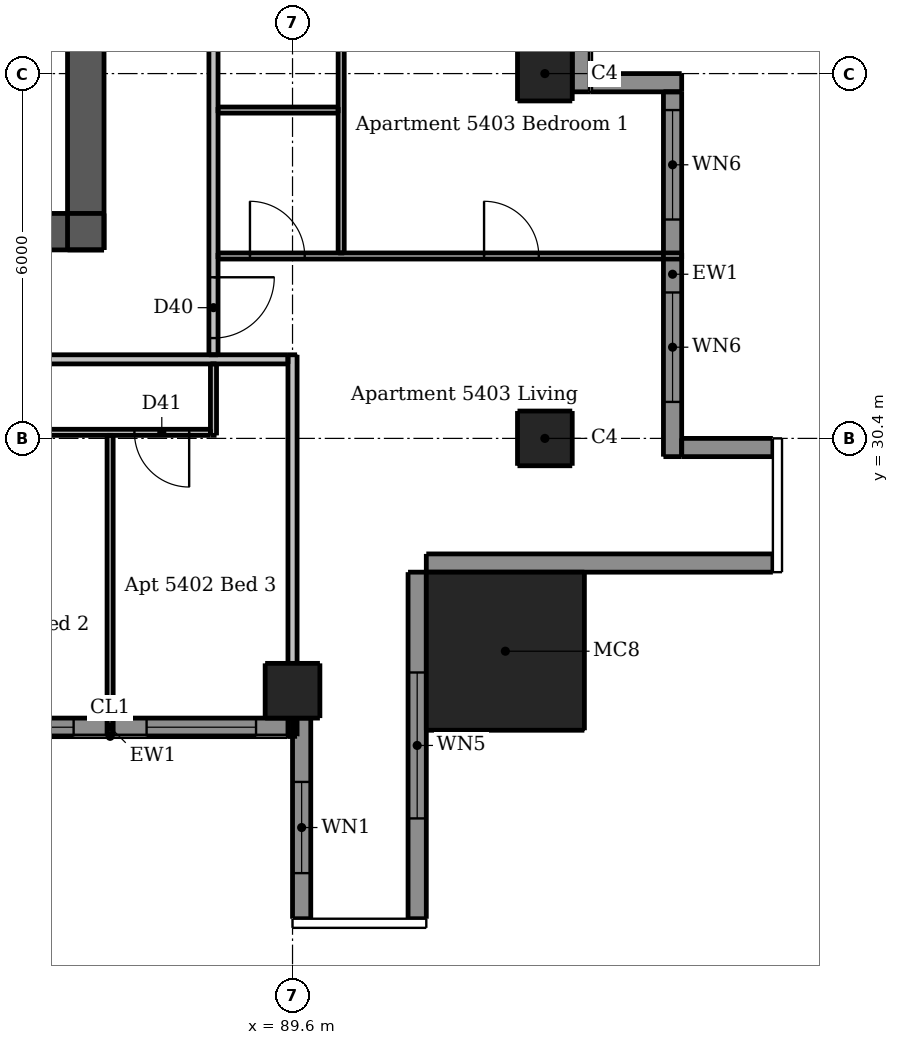
"""IFC4 building model, lengths in metres.
Left out: names, types, materials, properties, quantities, classifications, styles, units other than length and angle.
Written with IfcOpenShell. Run it as: python <this file> out.ifc"""

import sys

from ifc_helpers import new_model, si_unit, direction, frame, frame_2d, origin, origin_2d, place, context, subcontext, project, spatial, rectangle, extrude, element, fill, save


model = new_model("IFC4")
c1 = context("Model", 3, precision=1e-05, world=origin(), true_north=direction((0.0, 1.0)))
c2 = subcontext(c1, "Body", "Model", "MODEL_VIEW")
j1 = project(units=[si_unit("LENGTHUNIT", "METRE"), si_unit("PLANEANGLEUNIT", "RADIAN")], contexts=[c1])
p1 = place(None, origin())
s1 = spatial("IfcSite", under=j1, at=p1, CompositionType="ELEMENT")
p2 = place(p1, origin())
s2 = spatial("IfcBuilding", under=s1, at=p2, CompositionType="ELEMENT")
p3 = place(p2, frame((0.0, 0.0, 203.5)))
s3 = spatial("IfcBuildingStorey", under=s2, at=p3, CompositionType="ELEMENT", Elevation=203.5)
p4 = place(p3, frame((62.5, 33.8, 0.0), z_axis=(0.0, 0.0, 1.0), x_axis=(1.0, 0.0, 0.0)))
e1 = element("IfcWall", 1, at=p4, inside=s3, PredefinedType="SHEAR", context=c2, shape_type="SweptSolid", body=[
    extrude(rectangle(XDim=24.0, YDim=0.6, at=frame_2d((12.0, 0.0))), origin(), (0.0, 0.0, 1.0), 3.05),
])
p5 = place(p4, frame((1.925, 0.0, 0.0)))
e2 = element("IfcOpeningElement", 2, at=p5, cuts=e1, PredefinedType="OPENING", context=c2, shape_type="SweptSolid", body=[
    extrude(rectangle(XDim=1.1, YDim=2.1, at=frame_2d((0.55, 1.05))), frame((0.0, 0.31, 0.0), z_axis=(0.0, -1.0, 0.0), x_axis=(1.0, 0.0, 0.0)), (0.0, 0.0, 1.0), 0.62),
])
p6 = place(p4, frame((20.975, 0.0, 0.0)))
e3 = element("IfcOpeningElement", 3, at=p6, cuts=e1, PredefinedType="OPENING", context=c2, shape_type="SweptSolid", body=[
    extrude(rectangle(XDim=1.1, YDim=2.1, at=frame_2d((0.55, 1.05))), frame((0.0, 0.31, 0.0), z_axis=(0.0, -1.0, 0.0), x_axis=(1.0, 0.0, 0.0)), (0.0, 0.0, 1.0), 0.62),
])
p7 = place(p4, frame((8.0, 0.0, 0.0)))
e4 = element("IfcOpeningElement", 4, at=p7, cuts=e1, PredefinedType="OPENING", context=c2, shape_type="SweptSolid", body=[
    extrude(rectangle(XDim=1.1, YDim=2.1, at=frame_2d((0.55, 1.05))), frame((0.0, 0.31, 0.0), z_axis=(0.0, -1.0, 0.0), x_axis=(1.0, 0.0, 0.0)), (0.0, 0.0, 1.0), 0.62),
])
p8 = place(p4, frame((15.3, 0.0, 0.0)))
e5 = element("IfcOpeningElement", 5, at=p8, cuts=e1, PredefinedType="OPENING", context=c2, shape_type="SweptSolid", body=[
    extrude(rectangle(XDim=0.9, YDim=2.1, at=frame_2d((0.45, 1.05))), frame((0.0, 0.31, 0.0), z_axis=(0.0, -1.0, 0.0), x_axis=(1.0, 0.0, 0.0)), (0.0, 0.0, 1.0), 0.62),
])
p9 = place(p3, frame((86.2, 33.5, 0.0), z_axis=(0.0, 0.0, 1.0), x_axis=(0.0, 1.0, 0.0)))
e6 = element("IfcWall", 6, at=p9, inside=s3, PredefinedType="SHEAR", context=c2, shape_type="SweptSolid", body=[
    extrude(rectangle(XDim=24.0, YDim=0.6, at=frame_2d((12.0, 0.0))), origin(), (0.0, 0.0, 1.0), 3.05),
])
p10 = place(p9, frame((11.2, 0.0, 0.0)))
e7 = element("IfcOpeningElement", 7, at=p10, cuts=e6, PredefinedType="OPENING", context=c2, shape_type="SweptSolid", body=[
    extrude(rectangle(XDim=1.6, YDim=2.1, at=frame_2d((0.8, 1.05))), frame((0.0, 0.31, 0.0), z_axis=(0.0, -1.0, 0.0), x_axis=(1.0, 0.0, 0.0)), (0.0, 0.0, 1.0), 0.62),
])
for number, where, z_axis, x_axis in (
    (8, (89.6, 26.25, 0.0), (0.0, 0.0, 1.0), (1.0, 0.0, 0.0)),
    (9, (93.75, 30.4, 0.0), (0.0, 0.0, 1.0), (1.0, 0.0, 0.0)),
    (10, (93.75, 36.4, 0.0), (0.0, 0.0, 1.0), (1.0, 0.0, 0.0)),
):
    element("IfcColumn", number, at=place(p3, frame(where, z_axis=z_axis, x_axis=x_axis)), inside=s3, PredefinedType="COLUMN", context=c2, shape_type="SweptSolid", body=[
        extrude(rectangle(XDim=0.9, YDim=0.9, at=origin_2d()), origin(), (0.0, 0.0, 1.0), 3.05),
    ])
p11 = place(p3, frame((93.1, 26.9, 0.0), z_axis=(0.0, 0.0, 1.0), x_axis=(1.0, 0.0, 0.0)))
e11 = element("IfcColumn", 11, at=p11, inside=s3, PredefinedType="COLUMN", context=c2, shape_type="SweptSolid", body=[
    extrude(rectangle(XDim=2.6, YDim=2.6, at=origin_2d()), origin(), (0.0, 0.0, 1.0), 3.3),
])
p12 = place(p3, frame((89.75, 25.8, 0.0), z_axis=(0.0, 0.0, 1.0), x_axis=(0.0, -1.0, 0.0)))
e12 = element("IfcWall", 12, at=p12, inside=s3, PredefinedType="SOLIDWALL", context=c2, shape_type="SweptSolid", body=[
    extrude(rectangle(XDim=3.3, YDim=0.3, at=frame_2d((1.65, 0.0))), origin(), (0.0, 0.0, 1.0), 3.05),
])
p13 = place(p12, frame((1.05, 0.0, 0.9)))
e13 = element("IfcOpeningElement", 13, at=p13, cuts=e12, PredefinedType="OPENING", context=c2, shape_type="SweptSolid", body=[
    extrude(rectangle(XDim=1.5, YDim=1.5, at=frame_2d((0.75, 0.75))), frame((0.0, 0.16, 0.0), z_axis=(0.0, -1.0, 0.0), x_axis=(1.0, 0.0, 0.0)), (0.0, 0.0, 1.0), 0.32),
])
p14 = place(p3, frame((91.65, 22.5, 0.0), z_axis=(0.0, 0.0, 1.0), x_axis=(0.0, 1.0, 0.0)))
e14 = element("IfcWall", 14, at=p14, inside=s3, PredefinedType="SOLIDWALL", context=c2, shape_type="SweptSolid", body=[
    extrude(rectangle(XDim=5.7, YDim=0.3, at=frame_2d((2.85, 0.0))), origin(), (0.0, 0.0, 1.0), 3.05),
])
p15 = place(p14, frame((1.65, 0.0, 0.15)))
e15 = element("IfcOpeningElement", 15, at=p15, cuts=e14, PredefinedType="OPENING", context=c2, shape_type="SweptSolid", body=[
    extrude(rectangle(XDim=2.4, YDim=2.1, at=frame_2d((1.2, 1.05))), frame((0.0, 0.16, 0.0), z_axis=(0.0, -1.0, 0.0), x_axis=(1.0, 0.0, 0.0)), (0.0, 0.0, 1.0), 0.32),
])
p16 = place(p3, frame((91.8, 28.35, 0.0), z_axis=(0.0, 0.0, 1.0), x_axis=(1.0, 0.0, 0.0)))
e16 = element("IfcWall", 16, at=p16, inside=s3, PredefinedType="SOLIDWALL", context=c2, shape_type="SweptSolid", body=[
    extrude(rectangle(XDim=5.7, YDim=0.3, at=frame_2d((2.85, 0.0))), origin(), (0.0, 0.0, 1.0), 3.05),
])
for number, where, z_axis, x_axis in (
    (17, (97.5, 30.25, 0.0), (0.0, 0.0, 1.0), (-1.0, 0.0, 0.0)),
    (18, (96.0, 36.25, 0.0), (0.0, 0.0, 1.0), (-1.0, 0.0, 0.0)),
):
    element("IfcWall", number, at=place(p3, frame(where, z_axis=z_axis, x_axis=x_axis)), inside=s3, PredefinedType="SOLIDWALL", context=c2, shape_type="SweptSolid", body=[
        extrude(rectangle(XDim=1.5, YDim=0.3, at=frame_2d((0.75, 0.0))), origin(), (0.0, 0.0, 1.0), 3.05),
    ])
p17 = place(p3, frame((83.6, 25.65, 0.0), z_axis=(0.0, 0.0, 1.0), x_axis=(1.0, 0.0, 0.0)))
e19 = element("IfcWall", 19, at=p17, inside=s3, PredefinedType="SOLIDWALL", context=c2, shape_type="SweptSolid", body=[
    extrude(rectangle(XDim=6.0, YDim=0.3, at=frame_2d((3.0, 0.0))), origin(), (0.0, 0.0, 1.0), 3.05),
])
p18 = place(p17, frame((0.6, 0.0, 0.15)))
e20 = element("IfcOpeningElement", 20, at=p18, cuts=e19, PredefinedType="OPENING", context=c2, shape_type="SweptSolid", body=[
    extrude(rectangle(XDim=1.8, YDim=2.1, at=frame_2d((0.9, 1.05))), frame((0.0, 0.16, 0.0), z_axis=(0.0, -1.0, 0.0), x_axis=(1.0, 0.0, 0.0)), (0.0, 0.0, 1.0), 0.32),
])
p19 = place(p17, frame((3.6, 0.0, 0.15)))
e21 = element("IfcOpeningElement", 21, at=p19, cuts=e19, PredefinedType="OPENING", context=c2, shape_type="SweptSolid", body=[
    extrude(rectangle(XDim=1.8, YDim=2.1, at=frame_2d((0.9, 1.05))), frame((0.0, 0.16, 0.0), z_axis=(0.0, -1.0, 0.0), x_axis=(1.0, 0.0, 0.0)), (0.0, 0.0, 1.0), 0.32),
])
p20 = place(p3, frame((95.85, 30.1, 0.0), z_axis=(0.0, 0.0, 1.0), x_axis=(0.0, 1.0, 0.0)))
e22 = element("IfcWall", 22, at=p20, inside=s3, PredefinedType="SOLIDWALL", context=c2, shape_type="SweptSolid", body=[
    extrude(rectangle(XDim=6.0, YDim=0.3, at=frame_2d((3.0, 0.0))), origin(), (0.0, 0.0, 1.0), 3.05),
])
p21 = place(p20, frame((0.9, 0.0, 0.15)))
e23 = element("IfcOpeningElement", 23, at=p21, cuts=e22, PredefinedType="OPENING", context=c2, shape_type="SweptSolid", body=[
    extrude(rectangle(XDim=1.8, YDim=2.1, at=frame_2d((0.9, 1.05))), frame((0.0, 0.16, 0.0), z_axis=(0.0, -1.0, 0.0), x_axis=(1.0, 0.0, 0.0)), (0.0, 0.0, 1.0), 0.32),
])
p22 = place(p20, frame((3.9, 0.0, 0.15)))
e24 = element("IfcOpeningElement", 24, at=p22, cuts=e22, PredefinedType="OPENING", context=c2, shape_type="SweptSolid", body=[
    extrude(rectangle(XDim=1.8, YDim=2.1, at=frame_2d((0.9, 1.05))), frame((0.0, 0.16, 0.0), z_axis=(0.0, -1.0, 0.0), x_axis=(1.0, 0.0, 0.0)), (0.0, 0.0, 1.0), 0.32),
])
p23 = place(p3, frame((94.35, 36.1, 0.0), z_axis=(0.0, 0.0, 1.0), x_axis=(0.0, 1.0, 0.0)))
e25 = element("IfcWall", 25, at=p23, inside=s3, PredefinedType="SOLIDWALL", context=c2, shape_type="SweptSolid", body=[
    extrude(rectangle(XDim=6.2, YDim=0.3, at=frame_2d((3.1, 0.0))), origin(), (0.0, 0.0, 1.0), 3.05),
])
p24 = place(p23, frame((0.9, 0.0, 0.15)))
e26 = element("IfcOpeningElement", 26, at=p24, cuts=e25, PredefinedType="OPENING", context=c2, shape_type="SweptSolid", body=[
    extrude(rectangle(XDim=1.8, YDim=2.1, at=frame_2d((0.9, 1.05))), frame((0.0, 0.16, 0.0), z_axis=(0.0, -1.0, 0.0), x_axis=(1.0, 0.0, 0.0)), (0.0, 0.0, 1.0), 0.32),
])
p25 = place(p23, frame((3.9, 0.0, 0.15)))
e27 = element("IfcOpeningElement", 27, at=p25, cuts=e25, PredefinedType="OPENING", context=c2, shape_type="SweptSolid", body=[
    extrude(rectangle(XDim=1.8, YDim=2.1, at=frame_2d((0.9, 1.05))), frame((0.0, 0.16, 0.0), z_axis=(0.0, -1.0, 0.0), x_axis=(1.0, 0.0, 0.0)), (0.0, 0.0, 1.0), 0.32),
])
p26 = place(p3, frame((86.6, 25.5, 0.0), z_axis=(0.0, 0.0, 1.0), x_axis=(0.0, 1.0, 0.0)))
e28 = element("IfcWall", 28, at=p26, inside=s3, PredefinedType="PARTITIONING", context=c2, shape_type="SweptSolid", body=[
    extrude(rectangle(XDim=4.95, YDim=0.1, at=frame_2d((2.475, 0.0))), origin(), (0.0, 0.0, 1.0), 3.05),
])
p27 = place(p3, frame((88.3, 30.45, 0.0), z_axis=(0.0, 0.0, 1.0), x_axis=(0.0, 1.0, 0.0)))
e29 = element("IfcWall", 29, at=p27, inside=s3, PredefinedType="PARTITIONING", context=c2, shape_type="SweptSolid", body=[
    extrude(rectangle(XDim=1.175, YDim=0.1, at=frame_2d((0.587, 0.0))), origin(), (0.0, 0.0, 1.0), 3.05),
])
p28 = place(p3, frame((90.4, 33.45, 0.0), z_axis=(0.0, 0.0, 1.0), x_axis=(0.0, 1.0, 0.0)))
e30 = element("IfcWall", 30, at=p28, inside=s3, PredefinedType="PARTITIONING", context=c2, shape_type="SweptSolid", body=[
    extrude(rectangle(XDim=5.875, YDim=0.1, at=frame_2d((2.938, 0.0))), origin(), (0.0, 0.0, 1.0), 3.05),
])
p29 = place(p28, frame((3.75, 0.0, 0.0)))
e31 = element("IfcOpeningElement", 31, at=p29, cuts=e30, PredefinedType="OPENING", context=c2, shape_type="SweptSolid", body=[
    extrude(rectangle(XDim=0.8, YDim=2.1, at=frame_2d((0.4, 1.05))), frame((0.0, 0.06, 0.0), z_axis=(0.0, -1.0, 0.0), x_axis=(1.0, 0.0, 0.0)), (0.0, 0.0, 1.0), 0.12),
])
p30 = place(p3, frame((88.375, 35.8, 0.0), z_axis=(0.0, 0.0, 1.0), x_axis=(1.0, 0.0, 0.0)))
e32 = element("IfcWall", 32, at=p30, inside=s3, PredefinedType="PARTITIONING", context=c2, shape_type="SweptSolid", body=[
    extrude(rectangle(XDim=1.975, YDim=0.1, at=frame_2d((0.988, 0.0))), origin(), (0.0, 0.0, 1.0), 3.05),
])
p31 = place(p3, frame((88.375, 33.4, 0.0), z_axis=(0.0, 0.0, 1.0), x_axis=(1.0, 0.0, 0.0)))
e33 = element("IfcWall", 33, at=p31, inside=s3, PredefinedType="PARTITIONING", context=c2, shape_type="SweptSolid", body=[
    extrude(rectangle(XDim=7.625, YDim=0.1, at=frame_2d((3.812, 0.0))), origin(), (0.0, 0.0, 1.0), 3.05),
])
p32 = place(p31, frame((0.525, 0.0, 0.0)))
e34 = element("IfcOpeningElement", 34, at=p32, cuts=e33, PredefinedType="OPENING", context=c2, shape_type="SweptSolid", body=[
    extrude(rectangle(XDim=0.9, YDim=2.1, at=frame_2d((0.45, 1.05))), frame((0.0, 0.06, 0.0), z_axis=(0.0, -1.0, 0.0), x_axis=(1.0, 0.0, 0.0)), (0.0, 0.0, 1.0), 0.12),
])
p33 = place(p31, frame((4.375, 0.0, 0.0)))
e35 = element("IfcOpeningElement", 35, at=p33, cuts=e33, PredefinedType="OPENING", context=c2, shape_type="SweptSolid", body=[
    extrude(rectangle(XDim=0.9, YDim=2.1, at=frame_2d((0.45, 1.05))), frame((0.0, 0.06, 0.0), z_axis=(0.0, -1.0, 0.0), x_axis=(1.0, 0.0, 0.0)), (0.0, 0.0, 1.0), 0.12),
])
p34 = place(p3, frame((88.25, 30.5, 0.0), z_axis=(0.0, 0.0, 1.0), x_axis=(-1.0, 0.0, 0.0)))
e36 = element("IfcWall", 36, at=p34, inside=s3, PredefinedType="PARTITIONING", context=c2, shape_type="SweptSolid", body=[
    extrude(rectangle(XDim=16.575, YDim=0.1, at=frame_2d((8.288, 0.0))), origin(), (0.0, 0.0, 1.0), 3.05),
])
p35 = place(p34, frame((15.3, 0.0, 0.0)))
e37 = element("IfcOpeningElement", 37, at=p35, cuts=e36, PredefinedType="OPENING", context=c2, shape_type="SweptSolid", body=[
    extrude(rectangle(XDim=0.9, YDim=2.1, at=frame_2d((0.45, 1.05))), frame((0.0, 0.06, 0.0), z_axis=(0.0, -1.0, 0.0), x_axis=(1.0, 0.0, 0.0)), (0.0, 0.0, 1.0), 0.12),
])
p36 = place(p34, frame((11.4, 0.0, 0.0)))
e38 = element("IfcOpeningElement", 38, at=p36, cuts=e36, PredefinedType="OPENING", context=c2, shape_type="SweptSolid", body=[
    extrude(rectangle(XDim=0.9, YDim=2.1, at=frame_2d((0.45, 1.05))), frame((0.0, 0.06, 0.0), z_axis=(0.0, -1.0, 0.0), x_axis=(1.0, 0.0, 0.0)), (0.0, 0.0, 1.0), 0.12),
])
p37 = place(p34, frame((13.5, 0.0, 0.0)))
e39 = element("IfcOpeningElement", 39, at=p37, cuts=e36, PredefinedType="OPENING", context=c2, shape_type="SweptSolid", body=[
    extrude(rectangle(XDim=0.9, YDim=2.1, at=frame_2d((0.45, 1.05))), frame((0.0, 0.06, 0.0), z_axis=(0.0, -1.0, 0.0), x_axis=(1.0, 0.0, 0.0)), (0.0, 0.0, 1.0), 0.12),
])
p38 = place(p34, frame((8.7, 0.0, 0.0)))
e40 = element("IfcOpeningElement", 40, at=p38, cuts=e36, PredefinedType="OPENING", context=c2, shape_type="SweptSolid", body=[
    extrude(rectangle(XDim=0.9, YDim=2.1, at=frame_2d((0.45, 1.05))), frame((0.0, 0.06, 0.0), z_axis=(0.0, -1.0, 0.0), x_axis=(1.0, 0.0, 0.0)), (0.0, 0.0, 1.0), 0.12),
])
p39 = place(p34, frame((3.0, 0.0, 0.0)))
e41 = element("IfcOpeningElement", 41, at=p39, cuts=e36, PredefinedType="OPENING", context=c2, shape_type="SweptSolid", body=[
    extrude(rectangle(XDim=0.9, YDim=2.1, at=frame_2d((0.45, 1.05))), frame((0.0, 0.06, 0.0), z_axis=(0.0, -1.0, 0.0), x_axis=(1.0, 0.0, 0.0)), (0.0, 0.0, 1.0), 0.12),
])
p40 = place(p34, frame((0.35, 0.0, 0.0)))
e42 = element("IfcOpeningElement", 42, at=p40, cuts=e36, PredefinedType="OPENING", context=c2, shape_type="SweptSolid", body=[
    extrude(rectangle(XDim=0.9, YDim=2.1, at=frame_2d((0.45, 1.05))), frame((0.0, 0.06, 0.0), z_axis=(0.0, -1.0, 0.0), x_axis=(1.0, 0.0, 0.0)), (0.0, 0.0, 1.0), 0.12),
])
p41 = place(p34, frame((6.05, 0.0, 0.0)))
e43 = element("IfcOpeningElement", 43, at=p41, cuts=e36, PredefinedType="OPENING", context=c2, shape_type="SweptSolid", body=[
    extrude(rectangle(XDim=0.8, YDim=2.1, at=frame_2d((0.4, 1.05))), frame((0.0, 0.06, 0.0), z_axis=(0.0, -1.0, 0.0), x_axis=(1.0, 0.0, 0.0)), (0.0, 0.0, 1.0), 0.12),
])
p42 = place(p3, frame((88.3, 61.175, 0.0), z_axis=(0.0, 0.0, 1.0), x_axis=(0.0, -1.0, 0.0)))
e44 = element("IfcWall", 44, at=p42, inside=s3, PredefinedType="PARTITIONING", context=c2, shape_type="SweptSolid", body=[
    extrude(rectangle(XDim=29.4, YDim=0.15, at=frame_2d((14.7, 0.0))), origin(), (0.0, 0.0, 1.0), 3.05),
])
p43 = place(p42, frame((28.125, 0.0, 0.0)))
e45 = element("IfcOpeningElement", 45, at=p43, cuts=e44, PredefinedType="OPENING", context=c2, shape_type="SweptSolid", body=[
    extrude(rectangle(XDim=1.0, YDim=2.1, at=frame_2d((0.5, 1.05))), frame((0.0, 0.085, 0.0), z_axis=(0.0, -1.0, 0.0), x_axis=(1.0, 0.0, 0.0)), (0.0, 0.0, 1.0), 0.17),
])
p44 = place(p42, frame((10.775, 0.0, 0.0)))
e46 = element("IfcOpeningElement", 46, at=p44, cuts=e44, PredefinedType="OPENING", context=c2, shape_type="SweptSolid", body=[
    extrude(rectangle(XDim=1.0, YDim=2.1, at=frame_2d((0.5, 1.05))), frame((0.0, 0.085, 0.0), z_axis=(0.0, -1.0, 0.0), x_axis=(1.0, 0.0, 0.0)), (0.0, 0.0, 1.0), 0.17),
])
p45 = place(p3, frame((89.6, 25.5, 0.0), z_axis=(0.0, 0.0, 1.0), x_axis=(0.0, 1.0, 0.0)))
e47 = element("IfcWall", 47, at=p45, inside=s3, PredefinedType="PARTITIONING", context=c2, shape_type="SweptSolid", body=[
    extrude(rectangle(XDim=6.275, YDim=0.15, at=frame_2d((3.137, 0.0))), origin(), (0.0, 0.0, 1.0), 2.516),
])
p46 = place(p3, frame((89.525, 31.7, 0.0), z_axis=(0.0, 0.0, 1.0), x_axis=(-1.0, 0.0, 0.0)))
e48 = element("IfcWall", 48, at=p46, inside=s3, PredefinedType="PARTITIONING", context=c2, shape_type="SweptSolid", body=[
    extrude(rectangle(XDim=30.55, YDim=0.15, at=frame_2d((15.275, 0.0))), origin(), (0.0, 0.0, 1.0), 3.05),
])
p47 = place(p46, frame((26.775, 0.0, 0.0)))
e49 = element("IfcOpeningElement", 49, at=p47, cuts=e48, PredefinedType="OPENING", context=c2, shape_type="SweptSolid", body=[
    extrude(rectangle(XDim=1.0, YDim=2.1, at=frame_2d((0.5, 1.05))), frame((0.0, 0.085, 0.0), z_axis=(0.0, -1.0, 0.0), x_axis=(1.0, 0.0, 0.0)), (0.0, 0.0, 1.0), 0.17),
])
p48 = place(p46, frame((9.075, 0.0, 0.0)))
e50 = element("IfcOpeningElement", 50, at=p48, cuts=e48, PredefinedType="OPENING", context=c2, shape_type="SweptSolid", body=[
    extrude(rectangle(XDim=1.0, YDim=2.1, at=frame_2d((0.5, 1.05))), frame((0.0, 0.085, 0.0), z_axis=(0.0, -1.0, 0.0), x_axis=(1.0, 0.0, 0.0)), (0.0, 0.0, 1.0), 0.17),
])
p49 = place(p13, origin())
e51 = element("IfcWindow", 51, at=p49, inside=s3, PartitioningType="DOUBLE_PANEL_VERTICAL", PredefinedType="WINDOW", context=c2, shape_type="SweptSolid", body=[
    extrude(rectangle(XDim=1.5, YDim=1.5, at=frame_2d((0.75, 0.75))), frame((0.0, 0.03, 0.0), z_axis=(0.0, -1.0, 0.0), x_axis=(1.0, 0.0, 0.0)), (0.0, 0.0, 1.0), 0.06),
])
fill(e13, e51)
p50 = place(p15, origin())
e52 = element("IfcWindow", 52, at=p50, inside=s3, PartitioningType="DOUBLE_PANEL_VERTICAL", PredefinedType="WINDOW", context=c2, shape_type="SweptSolid", body=[
    extrude(rectangle(XDim=2.4, YDim=2.1, at=frame_2d((1.2, 1.05))), frame((0.0, 0.03, 0.0), z_axis=(0.0, -1.0, 0.0), x_axis=(1.0, 0.0, 0.0)), (0.0, 0.0, 1.0), 0.06),
])
fill(e15, e52)
p51 = place(p18, origin())
e53 = element("IfcWindow", 53, at=p51, inside=s3, PartitioningType="DOUBLE_PANEL_VERTICAL", PredefinedType="WINDOW", context=c2, shape_type="SweptSolid", body=[
    extrude(rectangle(XDim=1.8, YDim=2.1, at=frame_2d((0.9, 1.05))), frame((0.0, 0.03, 0.0), z_axis=(0.0, -1.0, 0.0), x_axis=(1.0, 0.0, 0.0)), (0.0, 0.0, 1.0), 0.06),
])
fill(e20, e53)
p52 = place(p19, origin())
e54 = element("IfcWindow", 54, at=p52, inside=s3, PartitioningType="DOUBLE_PANEL_VERTICAL", PredefinedType="WINDOW", context=c2, shape_type="SweptSolid", body=[
    extrude(rectangle(XDim=1.8, YDim=2.1, at=frame_2d((0.9, 1.05))), frame((0.0, 0.03, 0.0), z_axis=(0.0, -1.0, 0.0), x_axis=(1.0, 0.0, 0.0)), (0.0, 0.0, 1.0), 0.06),
])
fill(e21, e54)
p53 = place(p21, origin())
e55 = element("IfcWindow", 55, at=p53, inside=s3, PartitioningType="DOUBLE_PANEL_VERTICAL", PredefinedType="WINDOW", context=c2, shape_type="SweptSolid", body=[
    extrude(rectangle(XDim=1.8, YDim=2.1, at=frame_2d((0.9, 1.05))), frame((0.0, 0.03, 0.0), z_axis=(0.0, -1.0, 0.0), x_axis=(1.0, 0.0, 0.0)), (0.0, 0.0, 1.0), 0.06),
])
fill(e23, e55)
p54 = place(p22, origin())
e56 = element("IfcWindow", 56, at=p54, inside=s3, PartitioningType="DOUBLE_PANEL_VERTICAL", PredefinedType="WINDOW", context=c2, shape_type="SweptSolid", body=[
    extrude(rectangle(XDim=1.8, YDim=2.1, at=frame_2d((0.9, 1.05))), frame((0.0, 0.03, 0.0), z_axis=(0.0, -1.0, 0.0), x_axis=(1.0, 0.0, 0.0)), (0.0, 0.0, 1.0), 0.06),
])
fill(e24, e56)
p55 = place(p40, origin())
e57 = element("IfcDoor", 57, at=p55, inside=s3, OperationType="SINGLE_SWING_LEFT", PredefinedType="DOOR", context=c2, shape_type="SweptSolid", body=[
    extrude(rectangle(XDim=0.9, YDim=2.1, at=frame_2d((0.45, 1.05))), frame((0.0, 0.025, 0.0), z_axis=(0.0, -1.0, 0.0), x_axis=(1.0, 0.0, 0.0)), (0.0, 0.0, 1.0), 0.05),
])
fill(e42, e57)
p56 = place(p43, origin())
e58 = element("IfcDoor", 58, at=p56, inside=s3, OperationType="SINGLE_SWING_LEFT", PredefinedType="DOOR", context=c2, shape_type="SweptSolid", body=[
    extrude(rectangle(XDim=1.0, YDim=2.1, at=frame_2d((0.5, 1.05))), frame((0.0, 0.025, 0.0), z_axis=(0.0, -1.0, 0.0), x_axis=(1.0, 0.0, 0.0)), (0.0, 0.0, 1.0), 0.05),
])
fill(e45, e58)
p57 = place(p32, origin())
e59 = element("IfcDoor", 59, at=p57, inside=s3, OperationType="SINGLE_SWING_LEFT", PredefinedType="DOOR", context=c2, shape_type="SweptSolid", body=[
    extrude(rectangle(XDim=0.9, YDim=2.1, at=frame_2d((0.45, 1.05))), frame((0.0, 0.025, 0.0), z_axis=(0.0, -1.0, 0.0), x_axis=(1.0, 0.0, 0.0)), (0.0, 0.0, 1.0), 0.05),
])
fill(e34, e59)
p58 = place(p33, origin())
e60 = element("IfcDoor", 60, at=p58, inside=s3, OperationType="SINGLE_SWING_LEFT", PredefinedType="DOOR", context=c2, shape_type="SweptSolid", body=[
    extrude(rectangle(XDim=0.9, YDim=2.1, at=frame_2d((0.45, 1.05))), frame((0.0, 0.025, 0.0), z_axis=(0.0, -1.0, 0.0), x_axis=(1.0, 0.0, 0.0)), (0.0, 0.0, 1.0), 0.05),
])
fill(e35, e60)
save(model, sys.argv[1])
